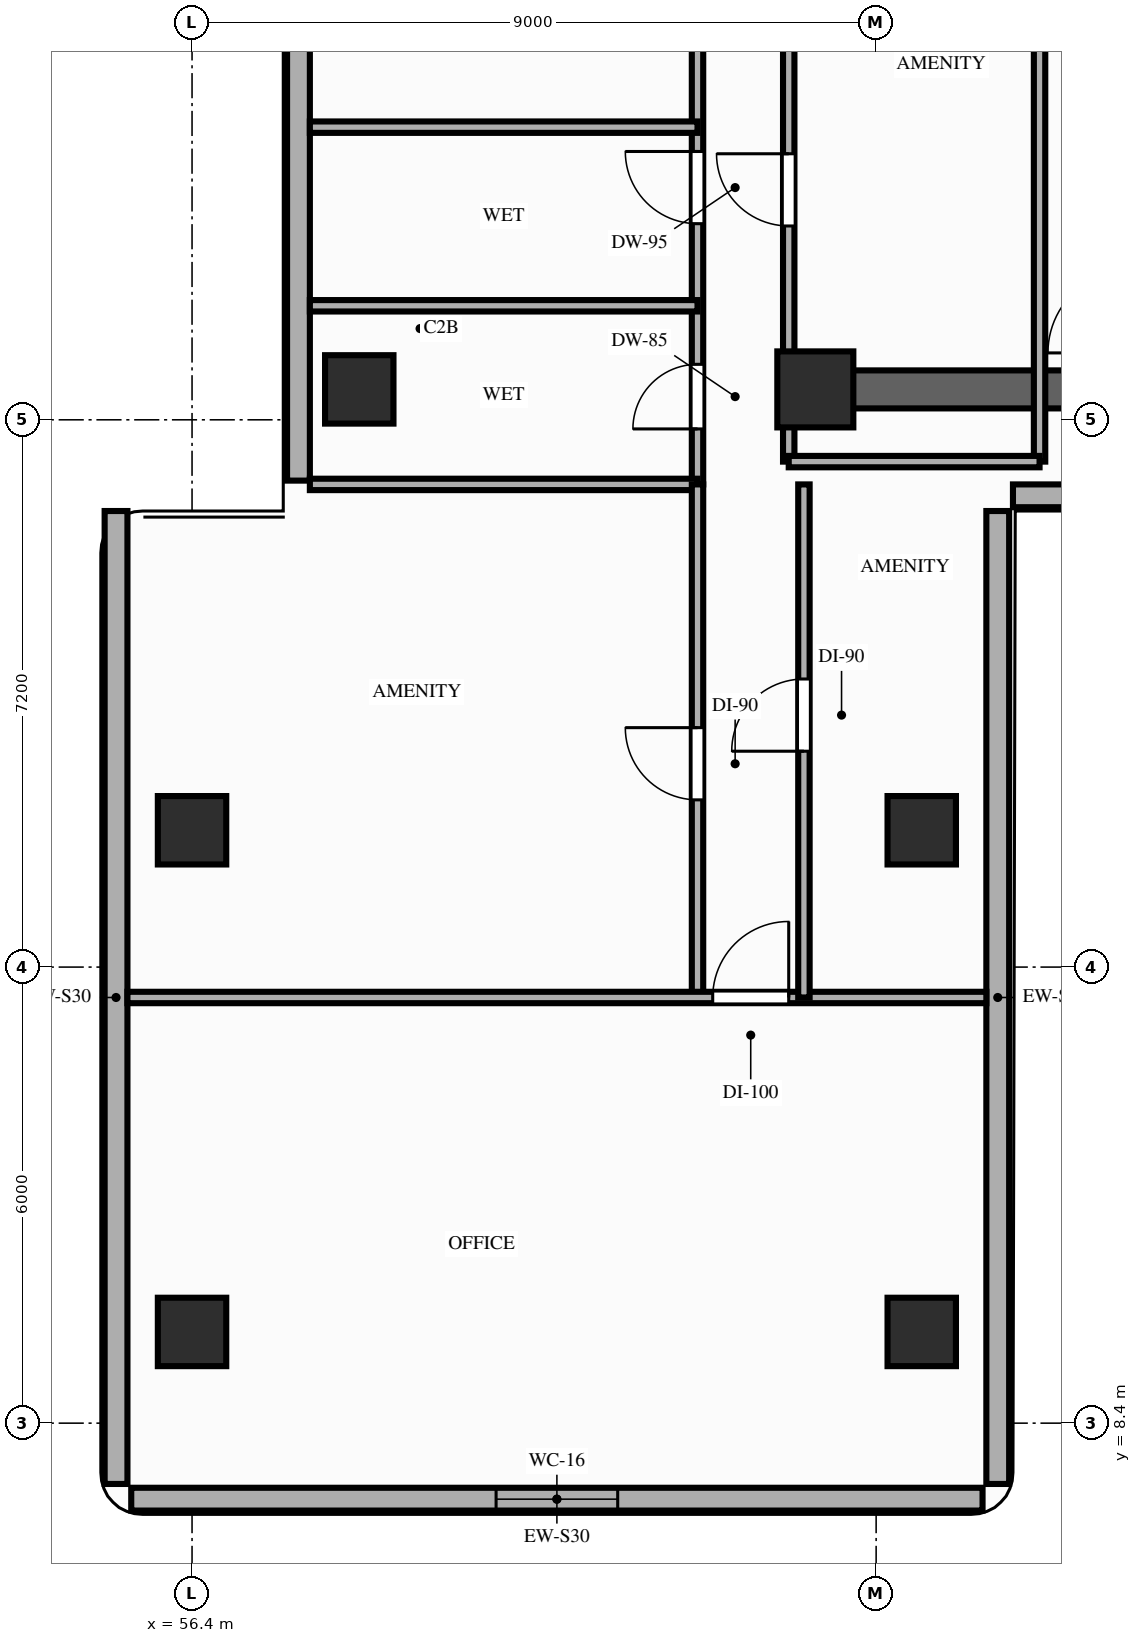
"""IFC4 building model, lengths in metres.
Left out: names, types, materials, properties, quantities, classifications, styles, units other than length and angle.
Written with IfcOpenShell. Run it as: python <this file> out.ifc"""

import sys

from ifc_helpers import new_model, si_unit, direction, frame, frame_2d, origin, origin_2d, place, context, subcontext, project, spatial, rectangle, extrude, element, fill, save


model = new_model("IFC4")
c1 = context("Model", 3, precision=1e-05, world=origin(), true_north=direction((0.0, 1.0)))
c2 = subcontext(c1, "Body", "Model", "MODEL_VIEW")
j1 = project(units=[si_unit("LENGTHUNIT", "METRE"), si_unit("PLANEANGLEUNIT", "RADIAN")], contexts=[c1])
p1 = place(None, origin())
s1 = spatial("IfcSite", under=j1, at=p1, CompositionType="ELEMENT")
p2 = place(p1, origin())
s2 = spatial("IfcBuilding", under=s1, at=p2, CompositionType="ELEMENT")
p3 = place(p2, frame((0.0, 0.0, 83.4)))
s3 = spatial("IfcBuildingStorey", under=s2, at=p3, CompositionType="ELEMENT", Elevation=83.4)
p4 = place(p3, frame((64.6, 22.0, 0.0), z_axis=(0.0, 0.0, 1.0), x_axis=(1.0, 0.0, 0.0)))
e1 = element("IfcColumn", 1, at=p4, inside=s3, PredefinedType="COLUMN", context=c2, shape_type="SweptSolid", body=[
    extrude(rectangle(XDim=1.0, YDim=1.0, at=origin_2d()), origin(), (0.0, 0.0, 1.0), 3.2),
])
for number, where, z_axis, x_axis in (
    (2, (58.6, 22.0, 0.0), (0.0, 0.0, 1.0), (1.0, 0.0, 0.0)),
    (3, (56.4, 9.6, 0.0), (0.0, 0.0, 1.0), (1.0, 0.0, 0.0)),
    (4, (56.4, 16.2, 0.0), (0.0, 0.0, 1.0), (1.0, 0.0, 0.0)),
    (5, (66.0, 9.6, 0.0), (0.0, 0.0, 1.0), (1.0, 0.0, 0.0)),
    (6, (66.0, 16.2, 0.0), (0.0, 0.0, 1.0), (1.0, 0.0, 0.0)),
):
    element("IfcColumn", number, at=place(p3, frame(where, z_axis=z_axis, x_axis=x_axis)), inside=s3, PredefinedType="COLUMN", context=c2, shape_type="SweptSolid", body=[
        extrude(rectangle(XDim=0.9, YDim=0.9, at=origin_2d()), origin(), (0.0, 0.0, 1.0), 3.2),
    ])
p5 = place(p3, frame((57.8, 43.4, 0.0), z_axis=(0.0, 0.0, 1.0), x_axis=(0.0, -1.0, 0.0)))
e7 = element("IfcWall", 7, at=p5, inside=s3, PredefinedType="STANDARD", context=c2, shape_type="SweptSolid", body=[
    extrude(rectangle(XDim=22.6, YDim=0.3, at=frame_2d((11.3, 0.0))), origin(), (0.0, 0.0, 1.0), 2.57),
])
p6 = place(p5, frame((3.7, 0.0, 0.0)))
e8 = element("IfcOpeningElement", 8, at=p6, cuts=e7, PredefinedType="OPENING", context=c2, shape_type="SweptSolid", body=[
    extrude(rectangle(XDim=1.4, YDim=2.1, at=frame_2d((0.7, 1.05))), frame((0.0, 0.16, 0.0), z_axis=(0.0, -1.0, 0.0), x_axis=(1.0, 0.0, 0.0)), (0.0, 0.0, 1.0), 0.32),
])
p7 = place(p3, frame((55.6, 7.4, 0.0), z_axis=(0.0, 0.0, 1.0), x_axis=(1.0, 0.0, 0.0)))
e9 = element("IfcWall", 9, at=p7, inside=s3, PredefinedType="STANDARD", context=c2, shape_type="SweptSolid", body=[
    extrude(rectangle(XDim=11.2, YDim=0.3, at=frame_2d((5.6, 0.0))), origin(), (0.0, 0.0, 1.0), 3.02),
])
p8 = place(p7, frame((4.8, 0.0, 0.85)))
e10 = element("IfcOpeningElement", 10, at=p8, cuts=e9, PredefinedType="OPENING", context=c2, shape_type="SweptSolid", body=[
    extrude(rectangle(XDim=1.6, YDim=1.7, at=frame_2d((0.8, 0.85))), frame((0.0, 0.16, 0.0), z_axis=(0.0, -1.0, 0.0), x_axis=(1.0, 0.0, 0.0)), (0.0, 0.0, 1.0), 0.32),
])
for number, where, z_axis, x_axis in (
    (11, (55.4, 20.4, 0.0), (0.0, 0.0, 1.0), (0.0, -1.0, 0.0)),
    (12, (67.0, 7.6, 0.0), (0.0, 0.0, 1.0), (0.0, 1.0, 0.0)),
):
    element("IfcWall", number, at=place(p3, frame(where, z_axis=z_axis, x_axis=x_axis)), inside=s3, PredefinedType="STANDARD", context=c2, shape_type="SweptSolid", body=[
        extrude(rectangle(XDim=12.8, YDim=0.3, at=frame_2d((6.4, 0.0))), origin(), (0.0, 0.0, 1.0), 3.02),
    ])
p9 = place(p3, frame((67.2, 20.6, 0.0), z_axis=(0.0, 0.0, 1.0), x_axis=(1.0, 0.0, 0.0)))
e13 = element("IfcWall", 13, at=p9, inside=s3, PredefinedType="STANDARD", context=c2, shape_type="SweptSolid", body=[
    extrude(rectangle(XDim=5.6, YDim=0.3, at=frame_2d((2.8, 0.0))), origin(), (0.0, 0.0, 1.0), 3.02),
])
p10 = place(p3, frame((64.6, 22.0, 0.0), z_axis=(0.0, 0.0, 1.0), x_axis=(1.0, 0.0, 0.0)))
e14 = element("IfcWall", 14, at=p10, inside=s3, PredefinedType="SHEAR", context=c2, shape_type="SweptSolid", body=[
    extrude(rectangle(XDim=7.5, YDim=0.5, at=frame_2d((3.75, 0.0))), origin(), (0.0, 0.0, 1.0), 3.02),
])
p11 = place(p3, frame((64.25, 21.05, 0.0), z_axis=(0.0, 0.0, 1.0), x_axis=(0.0, 1.0, 0.0)))
e15 = element("IfcWall", 15, at=p11, inside=s3, PredefinedType="PARTITIONING", context=c2, shape_type="SweptSolid", body=[
    extrude(rectangle(XDim=6.55, YDim=0.15, at=frame_2d((3.275, 0.0))), origin(), (0.0, 0.0, 1.0), 2.57),
])
p12 = place(p11, frame((3.1, 0.0, 0.0)))
e16 = element("IfcOpeningElement", 16, at=p12, cuts=e15, PredefinedType="OPENING", context=c2, shape_type="SweptSolid", body=[
    extrude(rectangle(XDim=0.95, YDim=2.15, at=frame_2d((0.475, 1.075))), frame((0.0, 0.085, 0.0), z_axis=(0.0, -1.0, 0.0), x_axis=(1.0, 0.0, 0.0)), (0.0, 0.0, 1.0), 0.17),
])
p13 = place(p3, frame((67.55, 21.05, 0.0), z_axis=(0.0, 0.0, 1.0), x_axis=(0.0, 1.0, 0.0)))
e17 = element("IfcWall", 17, at=p13, inside=s3, PredefinedType="PARTITIONING", context=c2, shape_type="SweptSolid", body=[
    extrude(rectangle(XDim=6.47, YDim=0.15, at=frame_2d((3.235, 0.0))), origin(), (0.0, 0.0, 1.0), 2.6),
])
p14 = place(p3, frame((64.25, 21.05, 0.0), z_axis=(0.0, 0.0, 1.0), x_axis=(1.0, 0.0, 0.0)))
e18 = element("IfcWall", 18, at=p14, inside=s3, PredefinedType="PARTITIONING", context=c2, shape_type="SweptSolid", body=[
    extrude(rectangle(XDim=3.3, YDim=0.15, at=frame_2d((1.65, 0.0))), origin(), (0.0, 0.0, 1.0), 2.57),
])
p15 = place(p3, frame((63.05, 20.75, 0.0), z_axis=(0.0, 0.0, 1.0), x_axis=(0.0, 1.0, 0.0)))
e19 = element("IfcWall", 19, at=p15, inside=s3, PredefinedType="PARTITIONING", context=c2, shape_type="SweptSolid", body=[
    extrude(rectangle(XDim=22.7, YDim=0.15, at=frame_2d((11.35, 0.0))), origin(), (0.0, 0.0, 1.0), 2.6),
])
p16 = place(p15, frame((0.73, 0.0, 0.0)))
e20 = element("IfcOpeningElement", 20, at=p16, cuts=e19, PredefinedType="OPENING", context=c2, shape_type="SweptSolid", body=[
    extrude(rectangle(XDim=0.85, YDim=2.1, at=frame_2d((0.425, 1.05))), frame((0.0, 0.085, 0.0), z_axis=(0.0, -1.0, 0.0), x_axis=(1.0, 0.0, 0.0)), (0.0, 0.0, 1.0), 0.17),
])
p17 = place(p15, frame((3.43, 0.0, 0.0)))
e21 = element("IfcOpeningElement", 21, at=p17, cuts=e19, PredefinedType="OPENING", context=c2, shape_type="SweptSolid", body=[
    extrude(rectangle(XDim=0.95, YDim=2.1, at=frame_2d((0.475, 1.05))), frame((0.0, 0.085, 0.0), z_axis=(0.0, -1.0, 0.0), x_axis=(1.0, 0.0, 0.0)), (0.0, 0.0, 1.0), 0.17),
])
p18 = place(p15, frame((8.15, 0.0, 0.0)))
e22 = element("IfcOpeningElement", 22, at=p18, cuts=e19, PredefinedType="OPENING", context=c2, shape_type="SweptSolid", body=[
    extrude(rectangle(XDim=0.95, YDim=2.15, at=frame_2d((0.475, 1.075))), frame((0.0, 0.085, 0.0), z_axis=(0.0, -1.0, 0.0), x_axis=(1.0, 0.0, 0.0)), (0.0, 0.0, 1.0), 0.17),
])
p19 = place(p3, frame((57.95, 20.75, 0.0), z_axis=(0.0, 0.0, 1.0), x_axis=(1.0, 0.0, 0.0)))
e23 = element("IfcWall", 23, at=p19, inside=s3, PredefinedType="PARTITIONING", context=c2, shape_type="SweptSolid", body=[
    extrude(rectangle(XDim=5.1, YDim=0.15, at=frame_2d((2.55, 0.0))), origin(), (0.0, 0.0, 1.0), 2.57),
])
for number, where, z_axis, x_axis in (
    (24, (57.95, 23.1, 0.0), (0.0, 0.0, 1.0), (1.0, 0.0, 0.0)),
    (25, (57.95, 25.45, 0.0), (0.0, 0.0, 1.0), (1.0, 0.0, 0.0)),
):
    element("IfcWall", number, at=place(p3, frame(where, z_axis=z_axis, x_axis=x_axis)), inside=s3, PredefinedType="PARTITIONING", context=c2, shape_type="SweptSolid", body=[
        extrude(rectangle(XDim=5.1, YDim=0.15, at=frame_2d((2.55, 0.0))), origin(), (0.0, 0.0, 1.0), 2.6),
    ])
p20 = place(p3, frame((63.05, 14.0, 0.0), z_axis=(0.0, 0.0, 1.0), x_axis=(0.0, 1.0, 0.0)))
e26 = element("IfcWall", 26, at=p20, inside=s3, PredefinedType="PARTITIONING", context=c2, shape_type="SweptSolid", body=[
    extrude(rectangle(XDim=6.75, YDim=0.15, at=frame_2d((3.375, 0.0))), origin(), (0.0, 0.0, 1.0), 2.57),
])
p21 = place(p20, frame((2.6, 0.0, 0.0)))
e27 = element("IfcOpeningElement", 27, at=p21, cuts=e26, PredefinedType="OPENING", context=c2, shape_type="SweptSolid", body=[
    extrude(rectangle(XDim=0.95, YDim=2.15, at=frame_2d((0.475, 1.075))), frame((0.0, 0.085, 0.0), z_axis=(0.0, -1.0, 0.0), x_axis=(1.0, 0.0, 0.0)), (0.0, 0.0, 1.0), 0.17),
])
p22 = place(p3, frame((55.55, 14.0, 0.0), z_axis=(0.0, 0.0, 1.0), x_axis=(1.0, 0.0, 0.0)))
e28 = element("IfcWall", 28, at=p22, inside=s3, PredefinedType="PARTITIONING", context=c2, shape_type="SweptSolid", body=[
    extrude(rectangle(XDim=11.3, YDim=0.15, at=frame_2d((5.65, 0.0))), origin(), (0.0, 0.0, 1.0), 2.57),
])
p23 = place(p22, frame((7.7, 0.0, 0.0)))
e29 = element("IfcOpeningElement", 29, at=p23, cuts=e28, PredefinedType="OPENING", context=c2, shape_type="SweptSolid", body=[
    extrude(rectangle(XDim=1.0, YDim=2.15, at=frame_2d((0.5, 1.075))), frame((0.0, 0.085, 0.0), z_axis=(0.0, -1.0, 0.0), x_axis=(1.0, 0.0, 0.0)), (0.0, 0.0, 1.0), 0.17),
])
p24 = place(p3, frame((64.45, 14.0, 0.0), z_axis=(0.0, 0.0, 1.0), x_axis=(0.0, 1.0, 0.0)))
e30 = element("IfcWall", 30, at=p24, inside=s3, PredefinedType="PARTITIONING", context=c2, shape_type="SweptSolid", body=[
    extrude(rectangle(XDim=6.75, YDim=0.15, at=frame_2d((3.375, 0.0))), origin(), (0.0, 0.0, 1.0), 2.57),
])
p25 = place(p24, frame((3.24, 0.0, 0.0)))
e31 = element("IfcOpeningElement", 31, at=p25, cuts=e30, PredefinedType="OPENING", context=c2, shape_type="SweptSolid", body=[
    extrude(rectangle(XDim=0.95, YDim=2.15, at=frame_2d((0.475, 1.075))), frame((0.0, 0.085, 0.0), z_axis=(0.0, -1.0, 0.0), x_axis=(1.0, 0.0, 0.0)), (0.0, 0.0, 1.0), 0.17),
])
p26 = place(p8, origin())
e32 = element("IfcWindow", 32, at=p26, inside=s3, PartitioningType="SINGLE_PANEL", PredefinedType="WINDOW", context=c2, shape_type="SweptSolid", body=[
    extrude(rectangle(XDim=1.6, YDim=1.7, at=frame_2d((0.8, 0.85))), frame((0.0, 0.03, 0.0), z_axis=(0.0, -1.0, 0.0), x_axis=(1.0, 0.0, 0.0)), (0.0, 0.0, 1.0), 0.06),
])
fill(e10, e32)
p27 = place(p12, origin())
e33 = element("IfcDoor", 33, at=p27, inside=s3, OperationType="SINGLE_SWING_RIGHT", PredefinedType="DOOR", context=c2, shape_type="SweptSolid", body=[
    extrude(rectangle(XDim=0.95, YDim=2.15, at=frame_2d((0.475, 1.075))), frame((0.0, 0.025, 0.0), z_axis=(0.0, -1.0, 0.0), x_axis=(1.0, 0.0, 0.0)), (0.0, 0.0, 1.0), 0.05),
])
fill(e16, e33)
p28 = place(p16, origin())
e34 = element("IfcDoor", 34, at=p28, inside=s3, OperationType="SINGLE_SWING_LEFT", PredefinedType="DOOR", context=c2, shape_type="SweptSolid", body=[
    extrude(rectangle(XDim=0.85, YDim=2.1, at=frame_2d((0.425, 1.05))), frame((0.0, 0.025, 0.0), z_axis=(0.0, -1.0, 0.0), x_axis=(1.0, 0.0, 0.0)), (0.0, 0.0, 1.0), 0.05),
])
fill(e20, e34)
p29 = place(p17, origin())
e35 = element("IfcDoor", 35, at=p29, inside=s3, OperationType="SINGLE_SWING_RIGHT", PredefinedType="DOOR", context=c2, shape_type="SweptSolid", body=[
    extrude(rectangle(XDim=0.95, YDim=2.1, at=frame_2d((0.475, 1.05))), frame((0.0, 0.025, 0.0), z_axis=(0.0, -1.0, 0.0), x_axis=(1.0, 0.0, 0.0)), (0.0, 0.0, 1.0), 0.05),
])
fill(e21, e35)
p30 = place(p21, origin())
e36 = element("IfcDoor", 36, at=p30, inside=s3, OperationType="SINGLE_SWING_RIGHT", PredefinedType="DOOR", context=c2, shape_type="SweptSolid", body=[
    extrude(rectangle(XDim=0.95, YDim=2.15, at=frame_2d((0.475, 1.075))), frame((0.0, 0.025, 0.0), z_axis=(0.0, -1.0, 0.0), x_axis=(1.0, 0.0, 0.0)), (0.0, 0.0, 1.0), 0.05),
])
fill(e27, e36)
p31 = place(p25, origin())
e37 = element("IfcDoor", 37, at=p31, inside=s3, OperationType="SINGLE_SWING_LEFT", PredefinedType="DOOR", context=c2, shape_type="SweptSolid", body=[
    extrude(rectangle(XDim=0.95, YDim=2.15, at=frame_2d((0.475, 1.075))), frame((0.0, 0.025, 0.0), z_axis=(0.0, -1.0, 0.0), x_axis=(1.0, 0.0, 0.0)), (0.0, 0.0, 1.0), 0.05),
])
fill(e31, e37)
p32 = place(p23, origin())
e38 = element("IfcDoor", 38, at=p32, inside=s3, OperationType="SINGLE_SWING_RIGHT", PredefinedType="DOOR", context=c2, shape_type="SweptSolid", body=[
    extrude(rectangle(XDim=1.0, YDim=2.15, at=frame_2d((0.5, 1.075))), frame((0.0, 0.025, 0.0), z_axis=(0.0, -1.0, 0.0), x_axis=(1.0, 0.0, 0.0)), (0.0, 0.0, 1.0), 0.05),
])
fill(e29, e38)
save(model, sys.argv[1])
